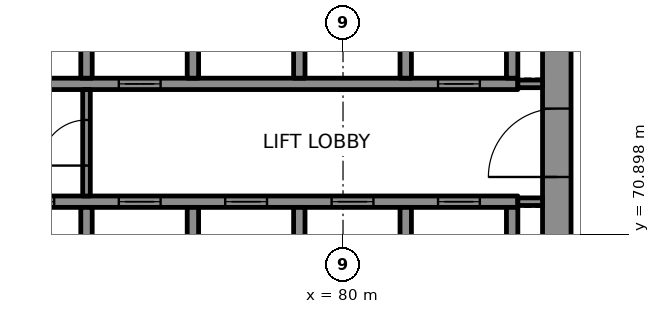
"""IFC4 building model, lengths in metres.
Left out: names, types, materials, properties, quantities, classifications, styles, units other than length and angle.
Written with IfcOpenShell. Run it as: python <this file> out.ifc"""

import sys

from ifc_helpers import new_model, si_unit, direction, frame, frame_2d, origin, place, context, subcontext, project, spatial, rectangle, extrude, element, fill, save


model = new_model("IFC4")
c1 = context("Model", 3, precision=1e-05, world=origin(), true_north=direction((0.0, 1.0)))
c2 = subcontext(c1, "Body", "Model", "MODEL_VIEW")
j1 = project(units=[si_unit("LENGTHUNIT", "METRE"), si_unit("PLANEANGLEUNIT", "RADIAN")], contexts=[c1])
p1 = place(None, origin())
s1 = spatial("IfcSite", under=j1, at=p1, CompositionType="ELEMENT")
p2 = place(p1, origin())
s2 = spatial("IfcBuilding", under=s1, at=p2, CompositionType="ELEMENT")
p3 = place(p2, frame((0.0, 0.0, 183.1)))
s3 = spatial("IfcBuildingStorey", under=s2, at=p3, CompositionType="ELEMENT", Elevation=183.1)
p4 = place(p3, frame((85.625, 67.75, 0.0), z_axis=(0.0, 0.0, 1.0), x_axis=(0.0, 1.0, 0.0)))
e1 = element("IfcWall", 1, at=p4, inside=s3, PredefinedType="SHEAR", context=c2, shape_type="SweptSolid", body=[
    extrude(rectangle(XDim=14.5, YDim=0.75, at=frame_2d((7.25, 0.0))), origin(), (0.0, 0.0, 1.0), 3.7),
])
p5 = place(p4, frame((4.65, 0.0, 0.0)))
e2 = element("IfcOpeningElement", 2, at=p5, cuts=e1, PredefinedType="OPENING", context=c2, shape_type="SweptSolid", body=[
    extrude(rectangle(XDim=1.8, YDim=2.1, at=frame_2d((0.9, 1.05))), frame((0.0, 0.385, 0.0), z_axis=(0.0, -1.0, 0.0), x_axis=(1.0, 0.0, 0.0)), (0.0, 0.0, 1.0), 0.77),
])
p6 = place(p4, frame((11.8, 0.0, 0.0)))
e3 = element("IfcOpeningElement", 3, at=p6, cuts=e1, PredefinedType="OPENING", context=c2, shape_type="SweptSolid", body=[
    extrude(rectangle(XDim=0.9, YDim=2.1, at=frame_2d((0.45, 1.05))), frame((0.0, 0.385, 0.0), z_axis=(0.0, -1.0, 0.0), x_axis=(1.0, 0.0, 0.0)), (0.0, 0.0, 1.0), 0.77),
])
p7 = place(p3, frame((70.3, 71.75, 0.0), z_axis=(0.0, 0.0, 1.0), x_axis=(1.0, 0.0, 0.0)))
e4 = element("IfcWall", 4, at=p7, inside=s3, PredefinedType="SHEAR", context=c2, shape_type="SweptSolid", body=[
    extrude(rectangle(XDim=14.3, YDim=0.3, at=frame_2d((7.15, 0.0))), origin(), (0.0, 0.0, 1.0), 3.7),
])
p8 = place(p7, frame((1.0, 0.0, 0.0)))
e5 = element("IfcOpeningElement", 5, at=p8, cuts=e4, PredefinedType="OPENING", context=c2, shape_type="SweptSolid", body=[
    extrude(rectangle(XDim=1.1, YDim=2.1, at=frame_2d((0.55, 1.05))), frame((0.0, 0.16, 0.0), z_axis=(0.0, -1.0, 0.0), x_axis=(1.0, 0.0, 0.0)), (0.0, 0.0, 1.0), 0.32),
])
p9 = place(p7, frame((3.8, 0.0, 0.0)))
e6 = element("IfcOpeningElement", 6, at=p9, cuts=e4, PredefinedType="OPENING", context=c2, shape_type="SweptSolid", body=[
    extrude(rectangle(XDim=1.1, YDim=2.1, at=frame_2d((0.55, 1.05))), frame((0.0, 0.16, 0.0), z_axis=(0.0, -1.0, 0.0), x_axis=(1.0, 0.0, 0.0)), (0.0, 0.0, 1.0), 0.32),
])
p10 = place(p7, frame((6.6, 0.0, 0.0)))
e7 = element("IfcOpeningElement", 7, at=p10, cuts=e4, PredefinedType="OPENING", context=c2, shape_type="SweptSolid", body=[
    extrude(rectangle(XDim=1.1, YDim=2.1, at=frame_2d((0.55, 1.05))), frame((0.0, 0.16, 0.0), z_axis=(0.0, -1.0, 0.0), x_axis=(1.0, 0.0, 0.0)), (0.0, 0.0, 1.0), 0.32),
])
p11 = place(p7, frame((9.4, 0.0, 0.0)))
e8 = element("IfcOpeningElement", 8, at=p11, cuts=e4, PredefinedType="OPENING", context=c2, shape_type="SweptSolid", body=[
    extrude(rectangle(XDim=1.1, YDim=2.1, at=frame_2d((0.55, 1.05))), frame((0.0, 0.16, 0.0), z_axis=(0.0, -1.0, 0.0), x_axis=(1.0, 0.0, 0.0)), (0.0, 0.0, 1.0), 0.32),
])
p12 = place(p7, frame((12.2, 0.0, 0.0)))
e9 = element("IfcOpeningElement", 9, at=p12, cuts=e4, PredefinedType="OPENING", context=c2, shape_type="SweptSolid", body=[
    extrude(rectangle(XDim=1.1, YDim=2.1, at=frame_2d((0.55, 1.05))), frame((0.0, 0.16, 0.0), z_axis=(0.0, -1.0, 0.0), x_axis=(1.0, 0.0, 0.0)), (0.0, 0.0, 1.0), 0.32),
])
p13 = place(p3, frame((70.3, 74.85, 0.0), z_axis=(0.0, 0.0, 1.0), x_axis=(1.0, 0.0, 0.0)))
e10 = element("IfcWall", 10, at=p13, inside=s3, PredefinedType="SHEAR", context=c2, shape_type="SweptSolid", body=[
    extrude(rectangle(XDim=14.3, YDim=0.3, at=frame_2d((7.15, 0.0))), origin(), (0.0, 0.0, 1.0), 3.7),
])
p14 = place(p13, frame((3.8, 0.0, 0.0)))
e11 = element("IfcOpeningElement", 11, at=p14, cuts=e10, PredefinedType="OPENING", context=c2, shape_type="SweptSolid", body=[
    extrude(rectangle(XDim=1.1, YDim=2.1, at=frame_2d((0.55, 1.05))), frame((0.0, 0.16, 0.0), z_axis=(0.0, -1.0, 0.0), x_axis=(1.0, 0.0, 0.0)), (0.0, 0.0, 1.0), 0.32),
])
p15 = place(p13, frame((12.2, 0.0, 0.0)))
e12 = element("IfcOpeningElement", 12, at=p15, cuts=e10, PredefinedType="OPENING", context=c2, shape_type="SweptSolid", body=[
    extrude(rectangle(XDim=1.1, YDim=2.1, at=frame_2d((0.55, 1.05))), frame((0.0, 0.16, 0.0), z_axis=(0.0, -1.0, 0.0), x_axis=(1.0, 0.0, 0.0)), (0.0, 0.0, 1.0), 0.32),
])
for number, where, z_axis, x_axis in (
    (13, (73.25, 69.0, 0.0), (0.0, 0.0, 1.0), (0.0, 1.0, 0.0)),
    (14, (73.25, 75.0, 0.0), (0.0, 0.0, 1.0), (0.0, 1.0, 0.0)),
    (15, (76.05, 69.0, 0.0), (0.0, 0.0, 1.0), (0.0, 1.0, 0.0)),
    (16, (76.05, 75.0, 0.0), (0.0, 0.0, 1.0), (0.0, 1.0, 0.0)),
    (17, (78.85, 69.0, 0.0), (0.0, 0.0, 1.0), (0.0, 1.0, 0.0)),
    (18, (78.85, 75.0, 0.0), (0.0, 0.0, 1.0), (0.0, 1.0, 0.0)),
    (19, (81.65, 69.0, 0.0), (0.0, 0.0, 1.0), (0.0, 1.0, 0.0)),
    (20, (81.65, 75.0, 0.0), (0.0, 0.0, 1.0), (0.0, 1.0, 0.0)),
    (21, (84.45, 69.0, 0.0), (0.0, 0.0, 1.0), (0.0, 1.0, 0.0)),
    (22, (84.45, 75.0, 0.0), (0.0, 0.0, 1.0), (0.0, 1.0, 0.0)),
):
    element("IfcWall", number, at=place(p3, frame(where, z_axis=z_axis, x_axis=x_axis)), inside=s3, PredefinedType="SHEAR", context=c2, shape_type="SweptSolid", body=[
        extrude(rectangle(XDim=2.6, YDim=0.3, at=frame_2d((1.3, 0.0))), origin(), (0.0, 0.0, 1.0), 3.7),
    ])
for number, where, z_axis, x_axis in (
    (23, (84.6, 71.75, 0.0), (0.0, 0.0, 1.0), (1.0, 0.0, 0.0)),
    (24, (84.6, 74.85, 0.0), (0.0, 0.0, 1.0), (1.0, 0.0, 0.0)),
):
    element("IfcWall", number, at=place(p3, frame(where, z_axis=z_axis, x_axis=x_axis)), inside=s3, PredefinedType="PARTITIONING", context=c2, shape_type="SweptSolid", body=[
        extrude(rectangle(XDim=0.65, YDim=0.2, at=frame_2d((0.325, 0.0))), origin(), (0.0, 0.0, 1.0), 3.7),
    ])
p16 = place(p3, frame((73.25, 71.9, 0.0), z_axis=(0.0, 0.0, 1.0), x_axis=(0.0, 1.0, 0.0)))
e25 = element("IfcWall", 25, at=p16, inside=s3, PredefinedType="PARTITIONING", context=c2, shape_type="SweptSolid", body=[
    extrude(rectangle(XDim=2.8, YDim=0.2, at=frame_2d((1.4, 0.0))), origin(), (0.0, 0.0, 1.0), 3.7),
])
p17 = place(p16, frame((0.8, 0.0, 0.0)))
e26 = element("IfcOpeningElement", 26, at=p17, cuts=e25, PredefinedType="OPENING", context=c2, shape_type="SweptSolid", body=[
    extrude(rectangle(XDim=1.2, YDim=2.1, at=frame_2d((0.6, 1.05))), frame((0.0, 0.11, 0.0), z_axis=(0.0, -1.0, 0.0), x_axis=(1.0, 0.0, 0.0)), (0.0, 0.0, 1.0), 0.22),
])
p18 = place(p8, origin())
e27 = element("IfcDoor", 27, at=p18, inside=s3, OperationType="DOUBLE_DOOR_SLIDING", PredefinedType="DOOR", context=c2, shape_type="SweptSolid", body=[
    extrude(rectangle(XDim=1.1, YDim=2.1, at=frame_2d((0.55, 1.05))), frame((0.0, 0.025, 0.0), z_axis=(0.0, -1.0, 0.0), x_axis=(1.0, 0.0, 0.0)), (0.0, 0.0, 1.0), 0.05),
])
fill(e5, e27)
p19 = place(p9, origin())
e28 = element("IfcDoor", 28, at=p19, inside=s3, OperationType="DOUBLE_DOOR_SLIDING", PredefinedType="DOOR", context=c2, shape_type="SweptSolid", body=[
    extrude(rectangle(XDim=1.1, YDim=2.1, at=frame_2d((0.55, 1.05))), frame((0.0, 0.025, 0.0), z_axis=(0.0, -1.0, 0.0), x_axis=(1.0, 0.0, 0.0)), (0.0, 0.0, 1.0), 0.05),
])
fill(e6, e28)
p20 = place(p10, origin())
e29 = element("IfcDoor", 29, at=p20, inside=s3, OperationType="DOUBLE_DOOR_SLIDING", PredefinedType="DOOR", context=c2, shape_type="SweptSolid", body=[
    extrude(rectangle(XDim=1.1, YDim=2.1, at=frame_2d((0.55, 1.05))), frame((0.0, 0.025, 0.0), z_axis=(0.0, -1.0, 0.0), x_axis=(1.0, 0.0, 0.0)), (0.0, 0.0, 1.0), 0.05),
])
fill(e7, e29)
p21 = place(p11, origin())
e30 = element("IfcDoor", 30, at=p21, inside=s3, OperationType="DOUBLE_DOOR_SLIDING", PredefinedType="DOOR", context=c2, shape_type="SweptSolid", body=[
    extrude(rectangle(XDim=1.1, YDim=2.1, at=frame_2d((0.55, 1.05))), frame((0.0, 0.025, 0.0), z_axis=(0.0, -1.0, 0.0), x_axis=(1.0, 0.0, 0.0)), (0.0, 0.0, 1.0), 0.05),
])
fill(e8, e30)
p22 = place(p12, origin())
e31 = element("IfcDoor", 31, at=p22, inside=s3, OperationType="DOUBLE_DOOR_SLIDING", PredefinedType="DOOR", context=c2, shape_type="SweptSolid", body=[
    extrude(rectangle(XDim=1.1, YDim=2.1, at=frame_2d((0.55, 1.05))), frame((0.0, 0.025, 0.0), z_axis=(0.0, -1.0, 0.0), x_axis=(1.0, 0.0, 0.0)), (0.0, 0.0, 1.0), 0.05),
])
fill(e9, e31)
p23 = place(p14, origin())
e32 = element("IfcDoor", 32, at=p23, inside=s3, OperationType="DOUBLE_DOOR_SLIDING", PredefinedType="DOOR", context=c2, shape_type="SweptSolid", body=[
    extrude(rectangle(XDim=1.1, YDim=2.1, at=frame_2d((0.55, 1.05))), frame((0.0, 0.025, 0.0), z_axis=(0.0, -1.0, 0.0), x_axis=(1.0, 0.0, 0.0)), (0.0, 0.0, 1.0), 0.05),
])
fill(e11, e32)
p24 = place(p15, origin())
e33 = element("IfcDoor", 33, at=p24, inside=s3, OperationType="DOUBLE_DOOR_SLIDING", PredefinedType="DOOR", context=c2, shape_type="SweptSolid", body=[
    extrude(rectangle(XDim=1.1, YDim=2.1, at=frame_2d((0.55, 1.05))), frame((0.0, 0.025, 0.0), z_axis=(0.0, -1.0, 0.0), x_axis=(1.0, 0.0, 0.0)), (0.0, 0.0, 1.0), 0.05),
])
fill(e12, e33)
p25 = place(p17, origin())
e34 = element("IfcDoor", 34, at=p25, inside=s3, OperationType="SINGLE_SWING_LEFT", PredefinedType="DOOR", context=c2, shape_type="SweptSolid", body=[
    extrude(rectangle(XDim=1.2, YDim=2.1, at=frame_2d((0.6, 1.05))), frame((0.0, 0.025, 0.0), z_axis=(0.0, -1.0, 0.0), x_axis=(1.0, 0.0, 0.0)), (0.0, 0.0, 1.0), 0.05),
])
fill(e26, e34)
p26 = place(p5, origin())
e35 = element("IfcDoor", 35, at=p26, inside=s3, OperationType="SINGLE_SWING_RIGHT", PredefinedType="DOOR", context=c2, shape_type="SweptSolid", body=[
    extrude(rectangle(XDim=1.8, YDim=2.1, at=frame_2d((0.9, 1.05))), frame((0.0, 0.095, 0.0), z_axis=(0.0, -1.0, 0.0), x_axis=(1.0, 0.0, 0.0)), (0.0, 0.0, 1.0), 0.19),
])
fill(e2, e35)
save(model, sys.argv[1])
